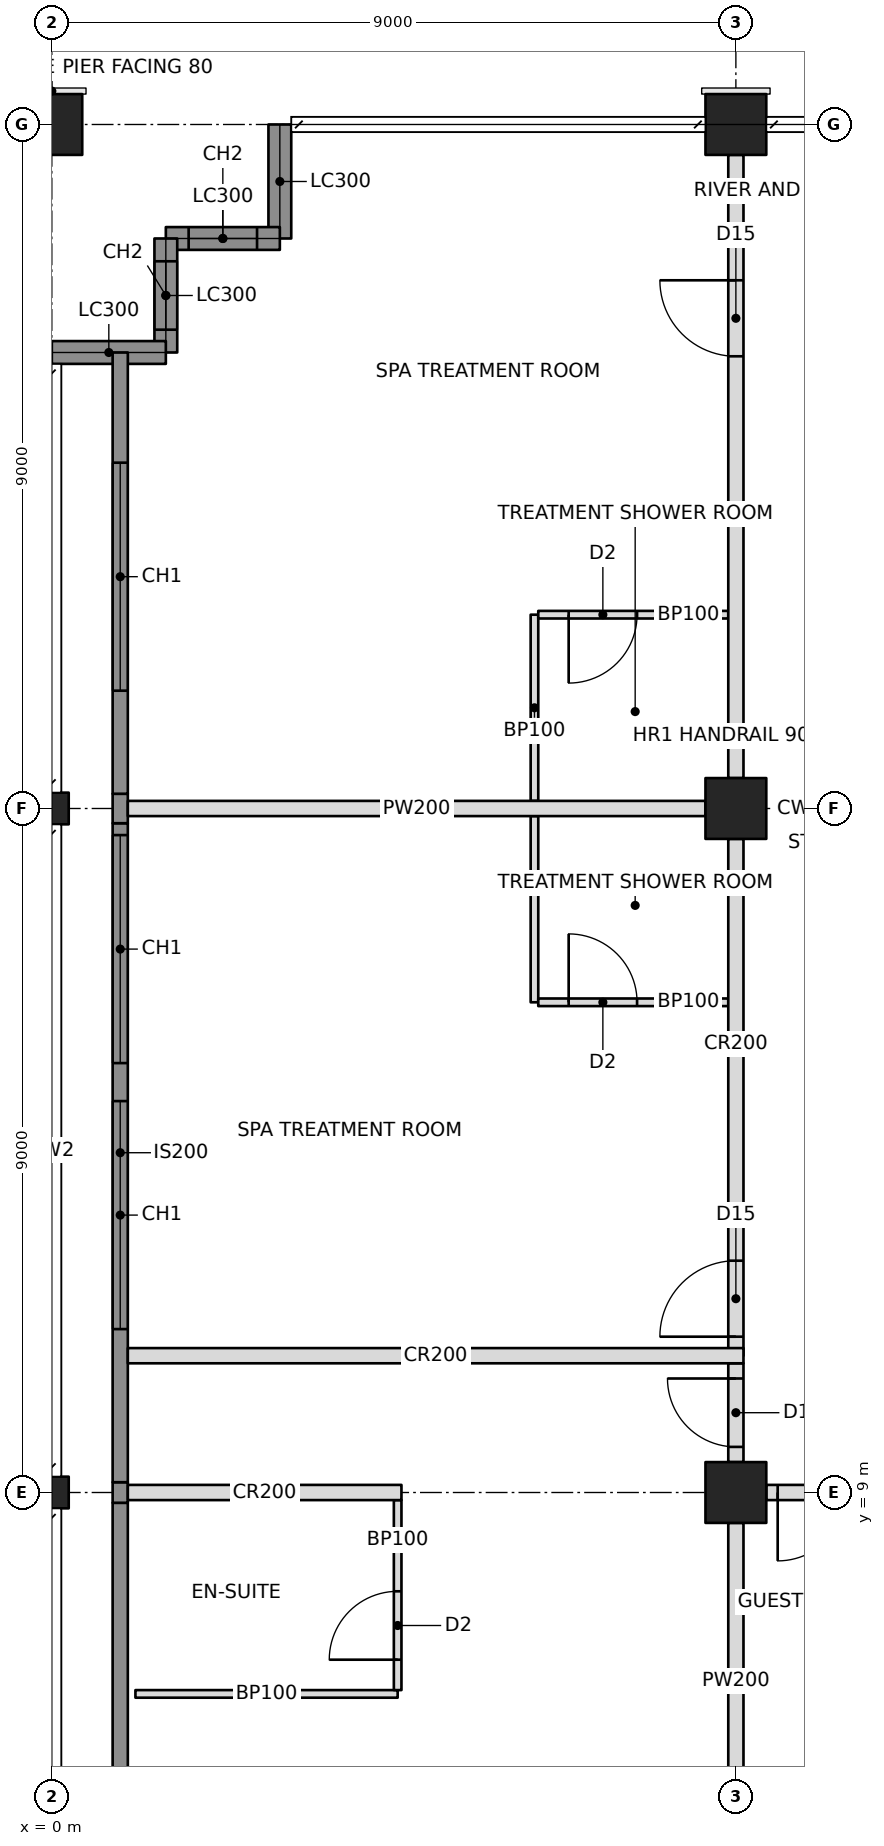
"""IFC4 building model, lengths in metres.
Left out: names, types, materials, properties, quantities, classifications, styles, units other than length and angle.
Written with IfcOpenShell. Run it as: python <this file> out.ifc"""

import sys

from ifc_helpers import new_model, si_unit, direction, frame, frame_2d, origin, origin_2d, place, context, subcontext, project, spatial, rectangle, hollow_rectangle, i_section, extrude, element, fill, save


model = new_model("IFC4")
c1 = context("Model", 3, precision=1e-05, world=origin(), true_north=direction((0.0, 1.0)))
c2 = subcontext(c1, "Body", "Model", "MODEL_VIEW")
j1 = project(units=[si_unit("LENGTHUNIT", "METRE"), si_unit("PLANEANGLEUNIT", "RADIAN")], contexts=[c1])
p1 = place(None, origin())
s1 = spatial("IfcSite", under=j1, at=p1, CompositionType="ELEMENT")
p2 = place(p1, origin())
s2 = spatial("IfcBuilding", under=s1, at=p2, CompositionType="ELEMENT")
p3 = place(p2, frame((0.0, 0.0, 262.6)))
s3 = spatial("IfcBuildingStorey", under=s2, at=p3, CompositionType="ELEMENT", Elevation=262.6)
for number, where, z_axis, x_axis in (
    (1, (0.0, 9.0, 0.0), (0.0, 0.0, 1.0), (0.0, 1.0, 0.0)),
    (2, (0.0, 18.0, 0.0), (0.0, 0.0, 1.0), (0.0, 1.0, 0.0)),
):
    element("IfcColumn", number, at=place(p3, frame(where, z_axis=z_axis, x_axis=x_axis)), inside=s3, PredefinedType="COLUMN", context=c2, shape_type="SweptSolid", body=[
        extrude(i_section(OverallWidth=0.417, OverallDepth=0.445, WebThickness=0.039, FlangeThickness=0.063, at=origin_2d()), origin(), (0.0, 0.0, 1.0), 3.6),
    ])
for number, where, z_axis, x_axis in (
    (3, (0.0, 27.0, 0.0), (0.0, 0.0, 1.0), (0.0, 1.0, 0.0)),
    (4, (9.0, 9.0, 0.0), (0.0, 0.0, 1.0), (1.0, 0.0, 0.0)),
    (5, (9.0, 18.0, 0.0), (0.0, 0.0, 1.0), (1.0, 0.0, 0.0)),
    (6, (9.0, 27.0, 0.0), (0.0, 0.0, 1.0), (1.0, 0.0, 0.0)),
):
    element("IfcColumn", number, at=place(p3, frame(where, z_axis=z_axis, x_axis=x_axis)), inside=s3, PredefinedType="COLUMN", context=c2, shape_type="SweptSolid", body=[
        extrude(hollow_rectangle(XDim=0.8, YDim=0.8, WallThickness=0.032, at=origin_2d()), origin(), (0.0, 0.0, 1.0), 3.6),
    ])
p4 = place(p3, frame((3.0, 27.0, 0.0), z_axis=(0.0, 0.0, 1.0), x_axis=(0.0, -1.0, 0.0)))
e7 = element("IfcWall", 7, at=p4, inside=s3, PredefinedType="SOLIDWALL", context=c2, shape_type="SweptSolid", body=[
    extrude(rectangle(XDim=1.5, YDim=0.3, at=frame_2d((0.75, 0.0))), origin(), (0.0, 0.0, 1.0), 2.62),
])
p5 = place(p3, frame((3.0, 25.5, 0.0), z_axis=(0.0, 0.0, 1.0), x_axis=(-1.0, 0.0, 0.0)))
e8 = element("IfcWall", 8, at=p5, inside=s3, PredefinedType="SOLIDWALL", context=c2, shape_type="SweptSolid", body=[
    extrude(rectangle(XDim=1.5, YDim=0.3, at=frame_2d((0.75, 0.0))), origin(), (0.0, 0.0, 1.0), 3.4),
])
p6 = place(p5, frame((0.3, 0.0, 0.6)))
e9 = element("IfcOpeningElement", 9, at=p6, cuts=e8, PredefinedType="OPENING", context=c2, shape_type="SweptSolid", body=[
    extrude(rectangle(XDim=0.9, YDim=2.2, at=frame_2d((0.45, 1.1))), frame((0.0, 0.16, 0.0), z_axis=(0.0, -1.0, 0.0), x_axis=(1.0, 0.0, 0.0)), (0.0, 0.0, 1.0), 0.32),
])
p7 = place(p3, frame((1.5, 25.5, 0.0), z_axis=(0.0, 0.0, 1.0), x_axis=(0.0, -1.0, 0.0)))
e10 = element("IfcWall", 10, at=p7, inside=s3, PredefinedType="SOLIDWALL", context=c2, shape_type="SweptSolid", body=[
    extrude(rectangle(XDim=1.5, YDim=0.3, at=frame_2d((0.75, 0.0))), origin(), (0.0, 0.0, 1.0), 3.4),
])
p8 = place(p7, frame((0.3, 0.0, 0.6)))
e11 = element("IfcOpeningElement", 11, at=p8, cuts=e10, PredefinedType="OPENING", context=c2, shape_type="SweptSolid", body=[
    extrude(rectangle(XDim=0.9, YDim=2.2, at=frame_2d((0.45, 1.1))), frame((0.0, 0.16, 0.0), z_axis=(0.0, -1.0, 0.0), x_axis=(1.0, 0.0, 0.0)), (0.0, 0.0, 1.0), 0.32),
])
p9 = place(p3, frame((1.5, 24.0, 0.0), z_axis=(0.0, 0.0, 1.0), x_axis=(-1.0, 0.0, 0.0)))
e12 = element("IfcWall", 12, at=p9, inside=s3, PredefinedType="SOLIDWALL", context=c2, shape_type="SweptSolid", body=[
    extrude(rectangle(XDim=1.5, YDim=0.3, at=frame_2d((0.75, 0.0))), origin(), (0.0, 0.0, 1.0), 2.62),
])
p10 = place(p3, frame((1.0, 9.0, 0.0), z_axis=(0.0, 0.0, 1.0), x_axis=(1.0, 0.0, 0.0)))
e13 = element("IfcWall", 13, at=p10, inside=s3, PredefinedType="PARTITIONING", context=c2, shape_type="SweptSolid", body=[
    extrude(rectangle(XDim=3.6, YDim=0.2, at=frame_2d((1.8, 0.0))), origin(), (0.0, 0.0, 1.0), 2.638),
])
p11 = place(p3, frame((9.4, 9.0, 0.0), z_axis=(0.0, 0.0, 1.0), x_axis=(1.0, 0.0, 0.0)))
e14 = element("IfcWall", 14, at=p11, inside=s3, PredefinedType="PARTITIONING", context=c2, shape_type="SweptSolid", body=[
    extrude(rectangle(XDim=8.2, YDim=0.2, at=frame_2d((4.1, 0.0))), origin(), (0.0, 0.0, 1.0), 2.605),
])
p12 = place(p11, frame((0.15, 0.0, 0.0)))
e15 = element("IfcOpeningElement", 15, at=p12, cuts=e14, PredefinedType="OPENING", context=c2, shape_type="SweptSolid", body=[
    extrude(rectangle(XDim=0.9, YDim=2.1, at=frame_2d((0.45, 1.05))), frame((0.0, 0.11, 0.0), z_axis=(0.0, -1.0, 0.0), x_axis=(1.0, 0.0, 0.0)), (0.0, 0.0, 1.0), 0.22),
])
p13 = place(p3, frame((9.0, 10.8, 0.0), z_axis=(0.0, 0.0, 1.0), x_axis=(0.0, 1.0, 0.0)))
e16 = element("IfcWall", 16, at=p13, inside=s3, PredefinedType="PARTITIONING", context=c2, shape_type="SweptSolid", body=[
    extrude(rectangle(XDim=6.8, YDim=0.2, at=frame_2d((3.4, 0.0))), origin(), (0.0, 0.0, 1.0), 2.605),
])
p14 = place(p13, frame((0.25, 0.0, 0.0)))
e17 = element("IfcOpeningElement", 17, at=p14, cuts=e16, PredefinedType="OPENING", context=c2, shape_type="SweptSolid", body=[
    extrude(rectangle(XDim=1.0, YDim=2.1, at=frame_2d((0.5, 1.05))), frame((0.0, 0.11, 0.0), z_axis=(0.0, -1.0, 0.0), x_axis=(1.0, 0.0, 0.0)), (0.0, 0.0, 1.0), 0.22),
])
p15 = place(p3, frame((9.0, 18.4, 0.0), z_axis=(0.0, 0.0, 1.0), x_axis=(0.0, 1.0, 0.0)))
e18 = element("IfcWall", 18, at=p15, inside=s3, PredefinedType="PARTITIONING", context=c2, shape_type="SweptSolid", body=[
    extrude(rectangle(XDim=8.2, YDim=0.2, at=frame_2d((4.1, 0.0))), origin(), (0.0, 0.0, 1.0), 2.605),
])
p16 = place(p15, frame((5.55, 0.0, 0.0)))
e19 = element("IfcOpeningElement", 19, at=p16, cuts=e18, PredefinedType="OPENING", context=c2, shape_type="SweptSolid", body=[
    extrude(rectangle(XDim=1.0, YDim=2.1, at=frame_2d((0.5, 1.05))), frame((0.0, 0.11, 0.0), z_axis=(0.0, -1.0, 0.0), x_axis=(1.0, 0.0, 0.0)), (0.0, 0.0, 1.0), 0.22),
])
p17 = place(p3, frame((1.0, 10.8, 0.0), z_axis=(0.0, 0.0, 1.0), x_axis=(1.0, 0.0, 0.0)))
e20 = element("IfcWall", 20, at=p17, inside=s3, PredefinedType="PARTITIONING", context=c2, shape_type="SweptSolid", body=[
    extrude(rectangle(XDim=8.1, YDim=0.2, at=frame_2d((4.05, 0.0))), origin(), (0.0, 0.0, 1.0), 2.604),
])
p18 = place(p3, frame((9.0, 8.6, 0.0), z_axis=(0.0, 0.0, 1.0), x_axis=(0.0, -1.0, 0.0)))
e21 = element("IfcWall", 21, at=p18, inside=s3, PredefinedType="PARTITIONING", context=c2, shape_type="SweptSolid", body=[
    extrude(rectangle(XDim=7.6, YDim=0.2, at=frame_2d((3.8, 0.0))), origin(), (0.0, 0.0, 1.0), 2.638),
])
p19 = place(p18, frame((4.3, 0.0, 0.0)))
e22 = element("IfcOpeningElement", 22, at=p19, cuts=e21, PredefinedType="OPENING", context=c2, shape_type="SweptSolid", body=[
    extrude(rectangle(XDim=1.0, YDim=2.1, at=frame_2d((0.5, 1.05))), frame((0.0, 0.11, 0.0), z_axis=(0.0, -1.0, 0.0), x_axis=(1.0, 0.0, 0.0)), (0.0, 0.0, 1.0), 0.22),
])
p20 = place(p3, frame((1.1, 6.35, 0.0), z_axis=(0.0, 0.0, 1.0), x_axis=(1.0, 0.0, 0.0)))
e23 = element("IfcWall", 23, at=p20, inside=s3, PredefinedType="PARTITIONING", context=c2, shape_type="SweptSolid", body=[
    extrude(rectangle(XDim=3.45, YDim=0.1, at=frame_2d((1.725, 0.0))), origin(), (0.0, 0.0, 1.0), 3.4),
])
p21 = place(p3, frame((4.55, 8.9, 0.0), z_axis=(0.0, 0.0, 1.0), x_axis=(0.0, -1.0, 0.0)))
e24 = element("IfcWall", 24, at=p21, inside=s3, PredefinedType="PARTITIONING", context=c2, shape_type="SweptSolid", body=[
    extrude(rectangle(XDim=2.5, YDim=0.1, at=frame_2d((1.25, 0.0))), origin(), (0.0, 0.0, 1.0), 2.638),
])
p22 = place(p21, frame((1.2, 0.0, 0.0)))
e25 = element("IfcOpeningElement", 25, at=p22, cuts=e24, PredefinedType="OPENING", context=c2, shape_type="SweptSolid", body=[
    extrude(rectangle(XDim=0.9, YDim=2.1, at=frame_2d((0.45, 1.05))), frame((0.0, 0.06, 0.0), z_axis=(0.0, -1.0, 0.0), x_axis=(1.0, 0.0, 0.0)), (0.0, 0.0, 1.0), 0.12),
])
p23 = place(p3, frame((8.6, 18.0, 0.0), z_axis=(0.0, 0.0, 1.0), x_axis=(-1.0, 0.0, 0.0)))
e26 = element("IfcWall", 26, at=p23, inside=s3, PredefinedType="PARTITIONING", context=c2, shape_type="SweptSolid", body=[
    extrude(rectangle(XDim=7.6, YDim=0.2, at=frame_2d((3.8, 0.0))), origin(), (0.0, 0.0, 1.0), 2.605),
])
p24 = place(p3, frame((6.35, 15.45, 0.0), z_axis=(0.0, 0.0, 1.0), x_axis=(0.0, 1.0, 0.0)))
e27 = element("IfcWall", 27, at=p24, inside=s3, PredefinedType="PARTITIONING", context=c2, shape_type="SweptSolid", body=[
    extrude(rectangle(XDim=2.45, YDim=0.1, at=frame_2d((1.225, 0.0))), origin(), (0.0, 0.0, 1.0), 2.604),
])
p25 = place(p3, frame((8.9, 15.45, 0.0), z_axis=(0.0, 0.0, 1.0), x_axis=(-1.0, 0.0, 0.0)))
e28 = element("IfcWall", 28, at=p25, inside=s3, PredefinedType="PARTITIONING", context=c2, shape_type="SweptSolid", body=[
    extrude(rectangle(XDim=2.5, YDim=0.1, at=frame_2d((1.25, 0.0))), origin(), (0.0, 0.0, 1.0), 2.604),
])
p26 = place(p25, frame((1.2, 0.0, 0.0)))
e29 = element("IfcOpeningElement", 29, at=p26, cuts=e28, PredefinedType="OPENING", context=c2, shape_type="SweptSolid", body=[
    extrude(rectangle(XDim=0.9, YDim=2.1, at=frame_2d((0.45, 1.05))), frame((0.0, 0.06, 0.0), z_axis=(0.0, -1.0, 0.0), x_axis=(1.0, 0.0, 0.0)), (0.0, 0.0, 1.0), 0.12),
])
p27 = place(p3, frame((6.35, 18.1, 0.0), z_axis=(0.0, 0.0, 1.0), x_axis=(0.0, 1.0, 0.0)))
e30 = element("IfcWall", 30, at=p27, inside=s3, PredefinedType="PARTITIONING", context=c2, shape_type="SweptSolid", body=[
    extrude(rectangle(XDim=2.45, YDim=0.1, at=frame_2d((1.225, 0.0))), origin(), (0.0, 0.0, 1.0), 2.604),
])
p28 = place(p3, frame((8.9, 20.55, 0.0), z_axis=(0.0, 0.0, 1.0), x_axis=(-1.0, 0.0, 0.0)))
e31 = element("IfcWall", 31, at=p28, inside=s3, PredefinedType="PARTITIONING", context=c2, shape_type="SweptSolid", body=[
    extrude(rectangle(XDim=2.5, YDim=0.1, at=frame_2d((1.25, 0.0))), origin(), (0.0, 0.0, 1.0), 2.604),
])
p29 = place(p28, frame((1.2, 0.0, 0.0)))
e32 = element("IfcOpeningElement", 32, at=p29, cuts=e31, PredefinedType="OPENING", context=c2, shape_type="SweptSolid", body=[
    extrude(rectangle(XDim=0.9, YDim=2.1, at=frame_2d((0.45, 1.05))), frame((0.0, 0.06, 0.0), z_axis=(0.0, -1.0, 0.0), x_axis=(1.0, 0.0, 0.0)), (0.0, 0.0, 1.0), 0.12),
])
p30 = place(p3, frame((9.0, 9.4, 0.0), z_axis=(0.0, 0.0, 1.0), x_axis=(0.0, 1.0, 0.0)))
e33 = element("IfcWall", 33, at=p30, inside=s3, PredefinedType="PARTITIONING", context=c2, shape_type="SweptSolid", body=[
    extrude(rectangle(XDim=1.3, YDim=0.2, at=frame_2d((0.65, 0.0))), origin(), (0.0, 0.0, 1.0), 2.605),
])
p31 = place(p30, frame((0.2, 0.0, 0.0)))
e34 = element("IfcOpeningElement", 34, at=p31, cuts=e33, PredefinedType="OPENING", context=c2, shape_type="SweptSolid", body=[
    extrude(rectangle(XDim=0.9, YDim=2.1, at=frame_2d((0.45, 1.05))), frame((0.0, 0.11, 0.0), z_axis=(0.0, -1.0, 0.0), x_axis=(1.0, 0.0, 0.0)), (0.0, 0.0, 1.0), 0.22),
])
p32 = place(p3, frame((0.9, 4.607, 0.0), z_axis=(0.0, 0.0, 1.0), x_axis=(0.0, 1.0, 0.0)))
e35 = element("IfcWall", 35, at=p32, inside=s3, PredefinedType="SOLIDWALL", context=c2, shape_type="SweptSolid", body=[
    extrude(rectangle(XDim=4.257, YDim=0.2, at=frame_2d((2.129, 0.0))), origin(), (0.0, 0.0, 1.0), 3.4),
])
p33 = place(p3, frame((0.9, 8.865, 0.0), z_axis=(0.0, 0.0, 1.0), x_axis=(0.0, 1.0, 0.0)))
e36 = element("IfcWall", 36, at=p33, inside=s3, PredefinedType="SOLIDWALL", context=c2, shape_type="SweptSolid", body=[
    extrude(rectangle(XDim=0.271, YDim=0.2, at=frame_2d((0.135, 0.0))), origin(), (0.0, 0.0, 1.0), 2.638),
])
p34 = place(p3, frame((0.9, 9.135, 0.0), z_axis=(0.0, 0.0, 1.0), x_axis=(0.0, 1.0, 0.0)))
e37 = element("IfcWall", 37, at=p34, inside=s3, PredefinedType="SOLIDWALL", context=c2, shape_type="SweptSolid", body=[
    extrude(rectangle(XDim=8.671, YDim=0.2, at=frame_2d((4.335, 0.0))), origin(), (0.0, 0.0, 1.0), 3.4),
])
p35 = place(p34, frame((2.015, 0.0, 0.6)))
e38 = element("IfcOpeningElement", 38, at=p35, cuts=e37, PredefinedType="OPENING", context=c2, shape_type="SweptSolid", body=[
    extrude(rectangle(XDim=3.0, YDim=2.2, at=frame_2d((1.5, 1.1))), frame((0.0, 0.11, 0.0), z_axis=(0.0, -1.0, 0.0), x_axis=(1.0, 0.0, 0.0)), (0.0, 0.0, 1.0), 0.22),
])
p36 = place(p34, frame((5.515, 0.0, 0.6)))
e39 = element("IfcOpeningElement", 39, at=p36, cuts=e37, PredefinedType="OPENING", context=c2, shape_type="SweptSolid", body=[
    extrude(rectangle(XDim=3.0, YDim=2.2, at=frame_2d((1.5, 1.1))), frame((0.0, 0.11, 0.0), z_axis=(0.0, -1.0, 0.0), x_axis=(1.0, 0.0, 0.0)), (0.0, 0.0, 1.0), 0.22),
])
p37 = place(p3, frame((0.9, 17.806, 0.0), z_axis=(0.0, 0.0, 1.0), x_axis=(0.0, 1.0, 0.0)))
e40 = element("IfcWall", 40, at=p37, inside=s3, PredefinedType="SOLIDWALL", context=c2, shape_type="SweptSolid", body=[
    extrude(rectangle(XDim=0.388, YDim=0.2, at=frame_2d((0.194, 0.0))), origin(), (0.0, 0.0, 1.0), 2.604),
])
p38 = place(p3, frame((0.9, 18.194, 0.0), z_axis=(0.0, 0.0, 1.0), x_axis=(0.0, 1.0, 0.0)))
e41 = element("IfcWall", 41, at=p38, inside=s3, PredefinedType="SOLIDWALL", context=c2, shape_type="SweptSolid", body=[
    extrude(rectangle(XDim=5.806, YDim=0.2, at=frame_2d((2.903, 0.0))), origin(), (0.0, 0.0, 1.0), 3.4),
])
p39 = place(p38, frame((1.356, 0.0, 0.6)))
e42 = element("IfcOpeningElement", 42, at=p39, cuts=e41, PredefinedType="OPENING", context=c2, shape_type="SweptSolid", body=[
    extrude(rectangle(XDim=3.0, YDim=2.2, at=frame_2d((1.5, 1.1))), frame((0.0, 0.11, 0.0), z_axis=(0.0, -1.0, 0.0), x_axis=(1.0, 0.0, 0.0)), (0.0, 0.0, 1.0), 0.22),
])
p40 = place(p6, origin())
e43 = element("IfcWindow", 43, at=p40, inside=s3, PartitioningType="SINGLE_PANEL", PredefinedType="WINDOW", context=c2, shape_type="SweptSolid", body=[
    extrude(rectangle(XDim=0.9, YDim=2.2, at=frame_2d((0.45, 1.1))), frame((0.0, 0.03, 0.0), z_axis=(0.0, -1.0, 0.0), x_axis=(1.0, 0.0, 0.0)), (0.0, 0.0, 1.0), 0.06),
])
fill(e9, e43)
p41 = place(p8, origin())
e44 = element("IfcWindow", 44, at=p41, inside=s3, PartitioningType="SINGLE_PANEL", PredefinedType="WINDOW", context=c2, shape_type="SweptSolid", body=[
    extrude(rectangle(XDim=0.9, YDim=2.2, at=frame_2d((0.45, 1.1))), frame((0.0, 0.03, 0.0), z_axis=(0.0, -1.0, 0.0), x_axis=(1.0, 0.0, 0.0)), (0.0, 0.0, 1.0), 0.06),
])
fill(e11, e44)
p42 = place(p35, origin())
e45 = element("IfcWindow", 45, at=p42, inside=s3, PartitioningType="TRIPLE_PANEL_VERTICAL", PredefinedType="WINDOW", context=c2, shape_type="SweptSolid", body=[
    extrude(rectangle(XDim=3.0, YDim=2.2, at=frame_2d((1.5, 1.1))), frame((0.0, 0.03, 0.0), z_axis=(0.0, -1.0, 0.0), x_axis=(1.0, 0.0, 0.0)), (0.0, 0.0, 1.0), 0.06),
])
fill(e38, e45)
p43 = place(p36, origin())
e46 = element("IfcWindow", 46, at=p43, inside=s3, PartitioningType="TRIPLE_PANEL_VERTICAL", PredefinedType="WINDOW", context=c2, shape_type="SweptSolid", body=[
    extrude(rectangle(XDim=3.0, YDim=2.2, at=frame_2d((1.5, 1.1))), frame((0.0, 0.03, 0.0), z_axis=(0.0, -1.0, 0.0), x_axis=(1.0, 0.0, 0.0)), (0.0, 0.0, 1.0), 0.06),
])
fill(e39, e46)
p44 = place(p39, origin())
e47 = element("IfcWindow", 47, at=p44, inside=s3, PartitioningType="TRIPLE_PANEL_VERTICAL", PredefinedType="WINDOW", context=c2, shape_type="SweptSolid", body=[
    extrude(rectangle(XDim=3.0, YDim=2.2, at=frame_2d((1.5, 1.1))), frame((0.0, 0.03, 0.0), z_axis=(0.0, -1.0, 0.0), x_axis=(1.0, 0.0, 0.0)), (0.0, 0.0, 1.0), 0.06),
])
fill(e42, e47)
p45 = place(p22, frame((0.9, 0.0, 0.0), z_axis=(0.0, 0.0, 1.0), x_axis=(-1.0, 0.0, 0.0)))
e48 = element("IfcDoor", 48, at=p45, inside=s3, OperationType="SINGLE_SWING_LEFT", PredefinedType="DOOR", context=c2, shape_type="SweptSolid", body=[
    extrude(rectangle(XDim=0.9, YDim=2.1, at=frame_2d((0.45, 1.05))), frame((0.0, 0.025, 0.0), z_axis=(0.0, -1.0, 0.0), x_axis=(1.0, 0.0, 0.0)), (0.0, 0.0, 1.0), 0.05),
])
fill(e25, e48)
p46 = place(p12, frame((0.9, 0.0, 0.0), z_axis=(0.0, 0.0, 1.0), x_axis=(-1.0, 0.0, 0.0)))
e49 = element("IfcDoor", 49, at=p46, inside=s3, OperationType="SINGLE_SWING_RIGHT", PredefinedType="DOOR", context=c2, shape_type="SweptSolid", body=[
    extrude(rectangle(XDim=0.9, YDim=2.1, at=frame_2d((0.45, 1.05))), frame((0.0, 0.025, 0.0), z_axis=(0.0, -1.0, 0.0), x_axis=(1.0, 0.0, 0.0)), (0.0, 0.0, 1.0), 0.05),
])
fill(e15, e49)
p47 = place(p26, frame((0.9, 0.0, 0.0), z_axis=(0.0, 0.0, 1.0), x_axis=(-1.0, 0.0, 0.0)))
e50 = element("IfcDoor", 50, at=p47, inside=s3, OperationType="SINGLE_SWING_LEFT", PredefinedType="DOOR", context=c2, shape_type="SweptSolid", body=[
    extrude(rectangle(XDim=0.9, YDim=2.1, at=frame_2d((0.45, 1.05))), frame((0.0, 0.025, 0.0), z_axis=(0.0, -1.0, 0.0), x_axis=(1.0, 0.0, 0.0)), (0.0, 0.0, 1.0), 0.05),
])
fill(e29, e50)
p48 = place(p14, origin())
e51 = element("IfcDoor", 51, at=p48, inside=s3, OperationType="SINGLE_SWING_LEFT", PredefinedType="DOOR", context=c2, shape_type="SweptSolid", body=[
    extrude(rectangle(XDim=1.0, YDim=2.1, at=frame_2d((0.5, 1.05))), frame((0.0, 0.025, 0.0), z_axis=(0.0, -1.0, 0.0), x_axis=(1.0, 0.0, 0.0)), (0.0, 0.0, 1.0), 0.05),
])
fill(e17, e51)
p49 = place(p29, origin())
e52 = element("IfcDoor", 52, at=p49, inside=s3, OperationType="SINGLE_SWING_RIGHT", PredefinedType="DOOR", context=c2, shape_type="SweptSolid", body=[
    extrude(rectangle(XDim=0.9, YDim=2.1, at=frame_2d((0.45, 1.05))), frame((0.0, 0.025, 0.0), z_axis=(0.0, -1.0, 0.0), x_axis=(1.0, 0.0, 0.0)), (0.0, 0.0, 1.0), 0.05),
])
fill(e32, e52)
p50 = place(p16, origin())
e53 = element("IfcDoor", 53, at=p50, inside=s3, OperationType="SINGLE_SWING_RIGHT", PredefinedType="DOOR", context=c2, shape_type="SweptSolid", body=[
    extrude(rectangle(XDim=1.0, YDim=2.1, at=frame_2d((0.5, 1.05))), frame((0.0, 0.025, 0.0), z_axis=(0.0, -1.0, 0.0), x_axis=(1.0, 0.0, 0.0)), (0.0, 0.0, 1.0), 0.05),
])
fill(e19, e53)
p51 = place(p31, origin())
e54 = element("IfcDoor", 54, at=p51, inside=s3, OperationType="SINGLE_SWING_RIGHT", PredefinedType="DOOR", context=c2, shape_type="SweptSolid", body=[
    extrude(rectangle(XDim=0.9, YDim=2.1, at=frame_2d((0.45, 1.05))), frame((0.0, 0.025, 0.0), z_axis=(0.0, -1.0, 0.0), x_axis=(1.0, 0.0, 0.0)), (0.0, 0.0, 1.0), 0.05),
])
fill(e34, e54)
save(model, sys.argv[1])
